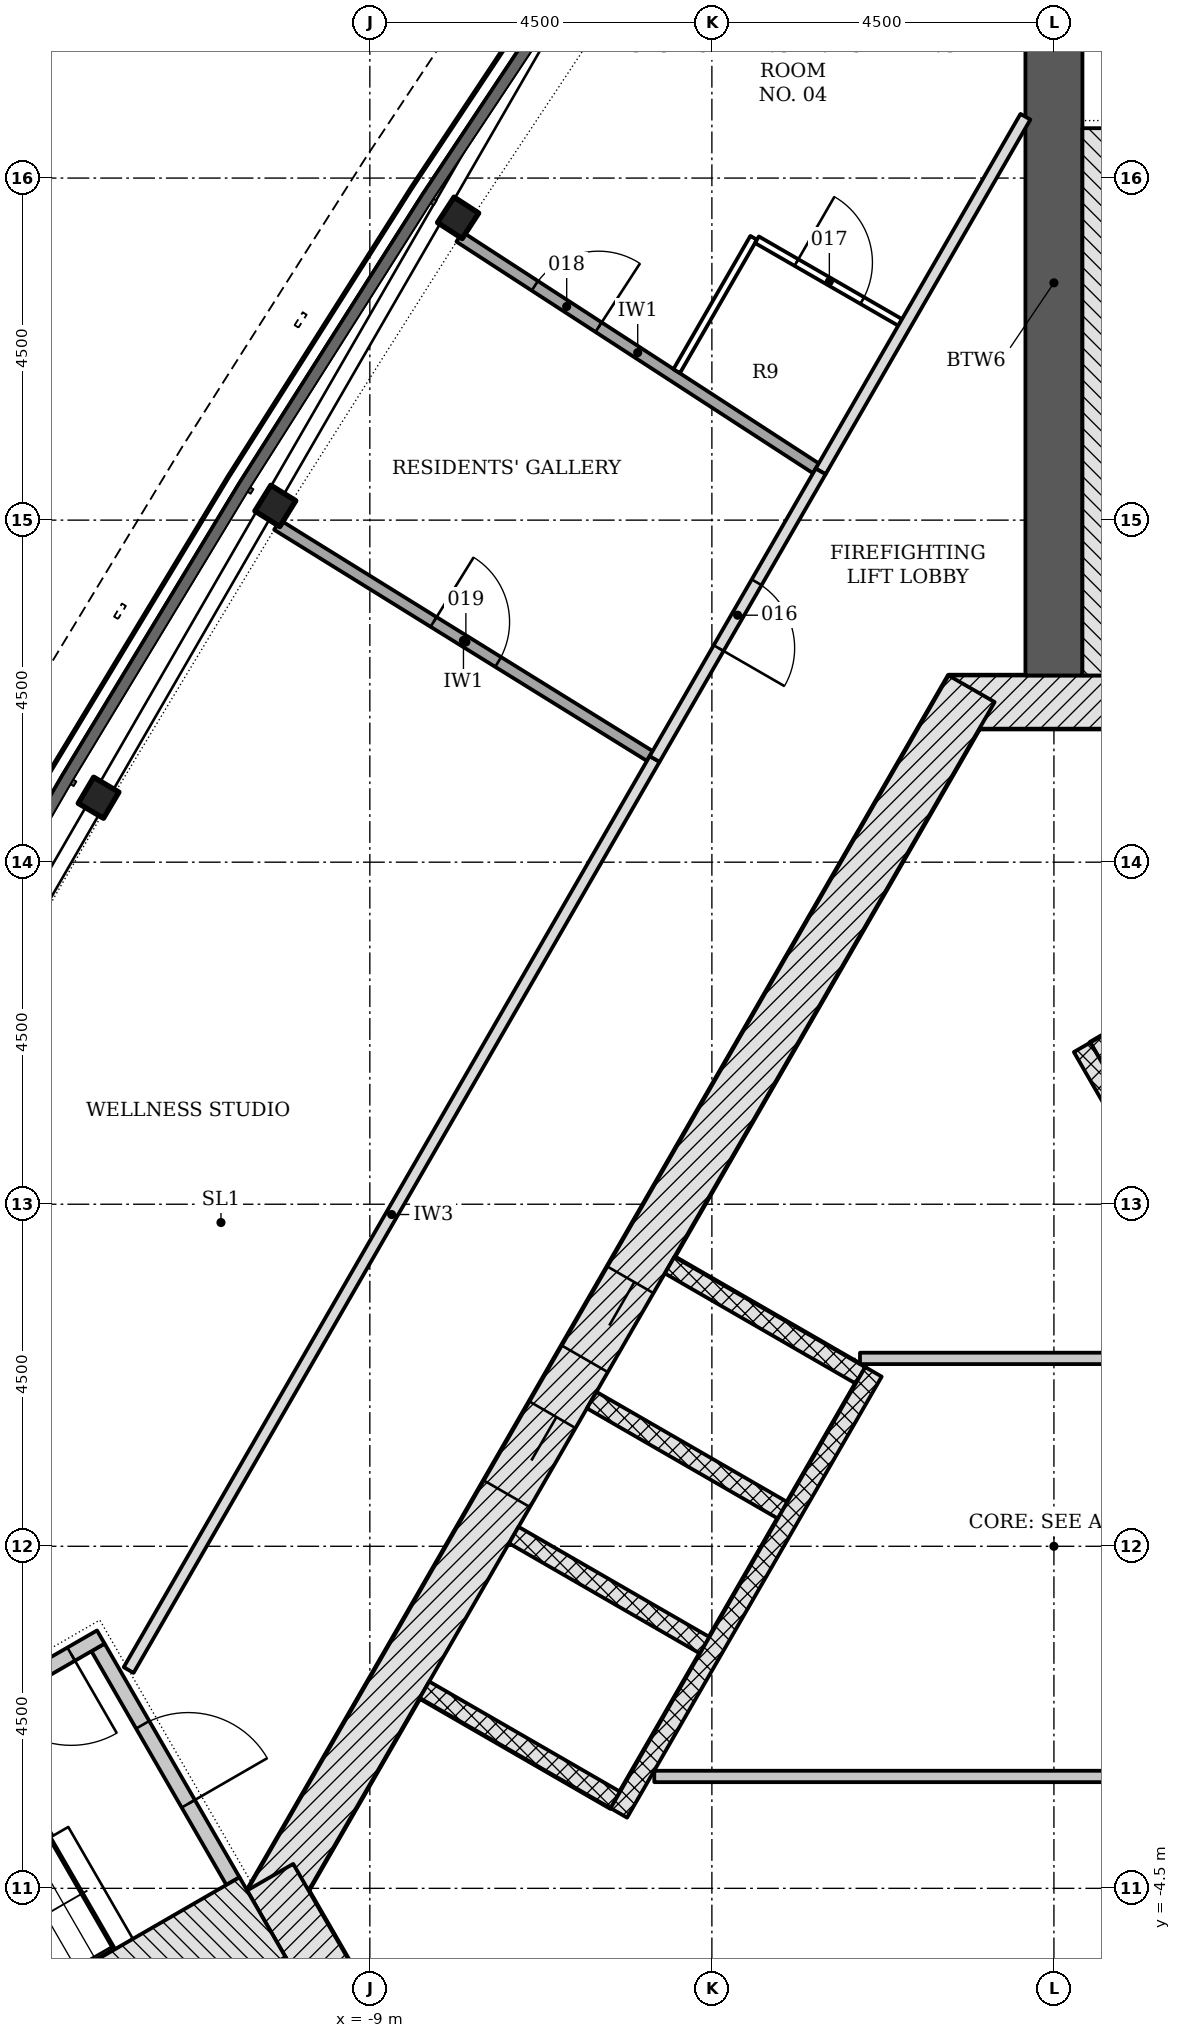
"""IFC4 building model, lengths in metres.
Left out: names, types, materials, properties, quantities, classifications, styles, units other than length and angle.
Written with IfcOpenShell. Run it as: python <this file> out.ifc"""

import sys

from ifc_helpers import new_model, si_unit, direction, frame, frame_2d, origin, origin_2d, place, context, subcontext, project, spatial, rectangle, i_section, extrude, element, fill, save


model = new_model("IFC4")
c1 = context("Model", 3, precision=1e-05, world=origin(), true_north=direction((0.0, 1.0)))
c2 = subcontext(c1, "Body", "Model", "MODEL_VIEW")
j1 = project(units=[si_unit("LENGTHUNIT", "METRE"), si_unit("PLANEANGLEUNIT", "RADIAN")], contexts=[c1])
p1 = place(None, origin())
s1 = spatial("IfcSite", under=j1, at=p1, CompositionType="ELEMENT")
p2 = place(p1, origin())
s2 = spatial("IfcBuilding", under=s1, at=p2, CompositionType="ELEMENT")
p3 = place(p2, frame((0.0, 0.0, 158.1)))
s3 = spatial("IfcBuildingStorey", under=s2, at=p3, CompositionType="ELEMENT", Elevation=158.1)
p4 = place(p3, frame((1.386, 11.106, -0.2), z_axis=(0.0, 0.0, 1.0), x_axis=(-1.0, 0.0, 0.0)))
e1 = element("IfcWall", 1, at=p4, inside=s3, PredefinedType="SHEAR", context=c2, shape_type="SweptSolid", body=[
    extrude(rectangle(XDim=2.771, YDim=0.7, at=frame_2d((1.386, 0.0))), origin(), (0.0, 0.0, 1.0), 3.6),
])
p5 = place(p3, frame((-1.083, 11.281, -0.2), z_axis=(0.0, 0.0, 1.0), x_axis=(-0.500001446645, -0.866024568562, 0.0)))
e2 = element("IfcWall", 2, at=p5, inside=s3, PredefinedType="SHEAR", context=c2, shape_type="SweptSolid", body=[
    extrude(rectangle(XDim=18.458, YDim=0.7, at=frame_2d((9.229, 0.0))), origin(), (0.0, 0.0, 1.0), 3.6),
])
p6 = place(p5, frame((8.979, 0.0, 0.2)))
e3 = element("IfcOpeningElement", 3, at=p6, cuts=e2, PredefinedType="OPENING", context=c2, shape_type="SweptSolid", body=[
    extrude(rectangle(XDim=1.2, YDim=2.1, at=frame_2d((0.6, 1.05))), frame((0.0, 0.36, 0.0), z_axis=(0.0, -1.0, 0.0), x_axis=(1.0, 0.0, 0.0)), (0.0, 0.0, 1.0), 0.72),
])
p7 = place(p5, frame((11.029, 0.0, 0.2)))
e4 = element("IfcOpeningElement", 4, at=p7, cuts=e2, PredefinedType="OPENING", context=c2, shape_type="SweptSolid", body=[
    extrude(rectangle(XDim=1.2, YDim=2.1, at=frame_2d((0.6, 1.05))), frame((0.0, 0.36, 0.0), z_axis=(0.0, -1.0, 0.0), x_axis=(1.0, 0.0, 0.0)), (0.0, 0.0, 1.0), 0.72),
])
p8 = place(p3, frame((-10.311, -4.353, -0.2), z_axis=(0.0, 0.0, 1.0), x_axis=(0.500042739161, -0.866000726912, 0.0)))
e5 = element("IfcWall", 5, at=p8, inside=s3, PredefinedType="SHEAR", context=c2, shape_type="SweptSolid", body=[
    extrude(rectangle(XDim=2.771, YDim=0.7, at=frame_2d((1.386, 0.0))), origin(), (0.0, 0.0, 1.0), 3.6),
])
p9 = place(p3, frame((0.0, 11.456, -0.2), z_axis=(0.0, 0.0, 1.0), x_axis=(0.0, 1.0, 0.0)))
e6 = element("IfcWall", 6, at=p9, inside=s3, PredefinedType="SHEAR", context=c2, shape_type="SweptSolid", body=[
    extrude(rectangle(XDim=10.331, YDim=0.75, at=frame_2d((5.166, 0.0))), origin(), (0.0, 0.0, 1.0), 3.6),
])
p10 = place(p3, frame((-9.922, -5.728, -0.2), z_axis=(0.0, 0.0, 1.0), x_axis=(-0.866025410072, -0.499999989109, 0.0)))
e7 = element("IfcWall", 7, at=p10, inside=s3, PredefinedType="SHEAR", context=c2, shape_type="SweptSolid", body=[
    extrude(rectangle(XDim=10.331, YDim=0.75, at=frame_2d((5.165, 0.0))), origin(), (0.0, 0.0, 1.0), 3.6),
])
for number, where, z_axis, x_axis in (
    (8, (-7.839, 17.477, -0.2), (0.0, 0.0, 1.0), (-0.545, -0.839, 0.0)),
    (9, (-10.244, 13.687, -0.2), (0.0, 0.0, 1.0), (-0.527, -0.85, 0.0)),
    (10, (-12.569, 9.848, -0.2), (0.0, 0.0, 1.0), (-0.509, -0.861, 0.0)),
):
    element("IfcColumn", number, at=place(p3, frame(where, z_axis=z_axis, x_axis=x_axis)), inside=s3, PredefinedType="COLUMN", context=c2, shape_type="SweptSolid", body=[
        extrude(i_section(OverallWidth=0.399, OverallDepth=0.386, WebThickness=0.021, FlangeThickness=0.033, FilletRadius=0.015, at=origin_2d()), origin(), (0.0, 0.0, 1.0), 3.6),
    ])
p11 = place(p3, frame((2.706, 7.769, -0.2), z_axis=(0.0, 0.0, 1.0), x_axis=(-0.866022959057, -0.500004234368, 0.0)))
e11 = element("IfcWall", 11, at=p11, inside=s3, PredefinedType="PARTITIONING", context=c2, shape_type="SweptSolid", body=[
    extrude(rectangle(XDim=2.5, YDim=0.25, at=frame_2d((1.25, 0.0))), origin(), (0.0, 0.0, 1.0), 3.6),
])
p12 = place(p3, frame((5.87, -2.961, 0.0), z_axis=(0.0, 0.0, 1.0), x_axis=(-0.50000615651, 0.866021849293, 0.0)))
e12 = element("IfcWall", 12, at=p12, inside=s3, PredefinedType="PARTITIONING", context=c2, shape_type="SweptSolid", body=[
    extrude(rectangle(XDim=11.0, YDim=0.25, at=frame_2d((5.5, 0.0))), origin(), (0.0, 0.0, 1.0), 3.4),
])
for number, where, z_axis, x_axis in (
    (13, (-5.056, 3.699, -0.2), (0.0, 0.0, 1.0), (0.866, -0.5, 0.0)),
    (14, (-6.081, 1.923, -0.2), (0.0, 0.0, 1.0), (0.866, -0.5, 0.0)),
    (15, (-7.106, 0.148, -0.2), (0.0, 0.0, 1.0), (0.866, -0.5, 0.0)),
    (16, (-8.281, -1.887, -0.2), (0.0, 0.0, 1.0), (0.866, -0.5, 0.0)),
):
    element("IfcWall", number, at=place(p3, frame(where, z_axis=z_axis, x_axis=x_axis)), inside=s3, PredefinedType="PARTITIONING", context=c2, shape_type="SweptSolid", body=[
        extrude(rectangle(XDim=2.9, YDim=0.25, at=frame_2d((1.45, 0.0))), origin(), (0.0, 0.0, 1.0), 3.6),
    ])
p13 = place(p3, frame((-2.374, 2.294, 0.0), z_axis=(0.0, 0.0, 1.0), x_axis=(-0.500003174267, -0.866023571113, 0.0)))
e17 = element("IfcWall", 17, at=p13, inside=s3, PredefinedType="PARTITIONING", context=c2, shape_type="SweptSolid", body=[
    extrude(rectangle(XDim=6.7, YDim=0.25, at=frame_2d((3.35, 0.0))), origin(), (0.0, 0.0, 1.0), 3.4),
])
p14 = place(p3, frame((-5.258, -3.028, 0.0), z_axis=(0.0, 0.0, 1.0), x_axis=(1.0, 0.0, 0.0)))
e18 = element("IfcWall", 18, at=p14, inside=s3, PredefinedType="PARTITIONING", context=c2, shape_type="SweptSolid", body=[
    extrude(rectangle(XDim=6.404, YDim=0.15, at=frame_2d((3.202, 0.0))), origin(), (0.0, 0.0, 1.0), 3.4),
])
p15 = place(p3, frame((-2.551, 2.472, 0.0), z_axis=(0.0, 0.0, 1.0), x_axis=(1.0, 0.0, 0.0)))
e19 = element("IfcWall", 19, at=p15, inside=s3, PredefinedType="PARTITIONING", context=c2, shape_type="SweptSolid", body=[
    extrude(rectangle(XDim=3.698, YDim=0.15, at=frame_2d((1.849, 0.0))), origin(), (0.0, 0.0, 1.0), 3.4),
])
p16 = place(p3, frame((0.98, 11.456, -0.2), z_axis=(0.0, 0.0, 1.0), x_axis=(0.0, 1.0, 0.0)))
e20 = element("IfcWall", 20, at=p16, inside=s3, PredefinedType="SHEAR", context=c2, shape_type="SweptSolid", body=[
    extrude(rectangle(XDim=7.2, YDim=1.211, at=frame_2d((3.6, 0.0))), origin(), (0.0, 0.0, 1.0), 3.6),
])
p17 = place(p3, frame((-12.576, -1.331, -0.2), z_axis=(0.0, 0.0, 1.0), x_axis=(0.499970499736, -0.8660424351, 0.0)))
e21 = element("IfcWall", 21, at=p17, inside=s3, PredefinedType="SHEAR", context=c2, shape_type="SweptSolid", body=[
    extrude(rectangle(XDim=3.55, YDim=0.2, at=frame_2d((1.775, 0.0))), origin(), (0.0, 0.0, 1.0), 3.6),
])
p18 = place(p17, frame((1.175, 0.0, 0.2)))
e22 = element("IfcOpeningElement", 22, at=p18, cuts=e21, PredefinedType="OPENING", context=c2, shape_type="SweptSolid", body=[
    extrude(rectangle(XDim=1.2, YDim=2.1, at=frame_2d((0.6, 1.05))), frame((0.0, 0.11, 0.0), z_axis=(0.0, -1.0, 0.0), x_axis=(1.0, 0.0, 0.0)), (0.0, 0.0, 1.0), 0.22),
])
p19 = place(p3, frame((-12.539, -1.194, -0.2), z_axis=(0.0, 0.0, 1.0), x_axis=(-0.866045472092, -0.499965239061, 0.0)))
e23 = element("IfcWall", 23, at=p19, inside=s3, PredefinedType="SHEAR", context=c2, shape_type="SweptSolid", body=[
    extrude(rectangle(XDim=5.6, YDim=0.2, at=frame_2d((2.8, 0.0))), origin(), (0.0, 0.0, 1.0), 3.6),
])
p20 = place(p19, frame((0.45, 0.0, 0.2)))
e24 = element("IfcOpeningElement", 24, at=p20, cuts=e23, PredefinedType="OPENING", context=c2, shape_type="SweptSolid", body=[
    extrude(rectangle(XDim=1.2, YDim=2.1, at=frame_2d((0.6, 1.05))), frame((0.0, 0.11, 0.0), z_axis=(0.0, -1.0, 0.0), x_axis=(1.0, 0.0, 0.0)), (0.0, 0.0, 1.0), 0.22),
])
p21 = place(p3, frame((-10.412, -4.879, -0.2), z_axis=(0.0, 0.0, 1.0), x_axis=(-0.866026919366, -0.499997374926, 0.0)))
e25 = element("IfcWall", 25, at=p21, inside=s3, PredefinedType="SHEAR", context=c2, shape_type="SweptSolid", body=[
    extrude(rectangle(XDim=7.2, YDim=1.211, at=frame_2d((3.6, 0.0))), origin(), (0.0, 0.0, 1.0), 3.6),
])
p22 = place(p3, frame((-0.375, 18.807, 0.0), z_axis=(0.0, 0.0, 1.0), x_axis=(-0.499989180974, -0.866031650062, 0.0)))
e26 = element("IfcWall", 26, at=p22, inside=s3, PredefinedType="PARTITIONING", context=c2, shape_type="SweptSolid", body=[
    extrude(rectangle(XDim=5.388, YDim=0.15, at=frame_2d((2.694, 0.0))), origin(), (0.0, 0.0, 1.0), 2.847),
])
p23 = place(p3, frame((-5.253, 10.358, 0.0), z_axis=(0.0, 0.0, 1.0), x_axis=(-0.49999425657, -0.86602871973, 0.0)))
e27 = element("IfcWall", 27, at=p23, inside=s3, PredefinedType="PARTITIONING", context=c2, shape_type="SweptSolid", body=[
    extrude(rectangle(XDim=13.84, YDim=0.15, at=frame_2d((6.92, 0.0))), origin(), (0.0, 0.0, 1.0), 2.847),
])
p24 = place(p3, frame((-7.82, 17.226, 0.0), z_axis=(0.0, 0.0, 1.0), x_axis=(0.838649113596, -0.544672070391, 0.0)))
e28 = element("IfcWall", 28, at=p24, inside=s3, PredefinedType="PARTITIONING", context=c2, shape_type="SweptSolid", body=[
    extrude(rectangle(XDim=5.59, YDim=0.15, at=frame_2d((2.795, 0.0))), origin(), (0.0, 0.0, 1.0), 3.4),
])
p25 = place(p24, frame((1.181, 0.0, 0.0)))
e29 = element("IfcOpeningElement", 29, at=p25, cuts=e28, PredefinedType="OPENING", context=c2, shape_type="SweptSolid", body=[
    extrude(rectangle(XDim=1.0, YDim=2.1, at=frame_2d((0.5, 1.05))), frame((0.0, 0.085, 0.0), z_axis=(0.0, -1.0, 0.0), x_axis=(1.0, 0.0, 0.0)), (0.0, 0.0, 1.0), 0.17),
])
p26 = place(p3, frame((-10.22, 13.437, 0.0), z_axis=(0.0, 0.0, 1.0), x_axis=(0.849899659129, -0.526944560094, 0.0)))
e30 = element("IfcWall", 30, at=p26, inside=s3, PredefinedType="PARTITIONING", context=c2, shape_type="SweptSolid", body=[
    extrude(rectangle(XDim=5.769, YDim=0.15, at=frame_2d((2.884, 0.0))), origin(), (0.0, 0.0, 1.0), 3.4),
])
p27 = place(p26, frame((2.422, 0.0, 0.0)))
e31 = element("IfcOpeningElement", 31, at=p27, cuts=e30, PredefinedType="OPENING", context=c2, shape_type="SweptSolid", body=[
    extrude(rectangle(XDim=1.0, YDim=2.1, at=frame_2d((0.5, 1.05))), frame((0.0, 0.085, 0.0), z_axis=(0.0, -1.0, 0.0), x_axis=(1.0, 0.0, 0.0)), (0.0, 0.0, 1.0), 0.17),
])
p28 = place(p3, frame((-3.069, 14.141, 0.0), z_axis=(0.0, 0.0, 1.0), x_axis=(-0.500015937133, -0.866016202281, 0.0)))
e32 = element("IfcWall", 32, at=p28, inside=s3, PredefinedType="PARTITIONING", context=c2, shape_type="SweptSolid", body=[
    extrude(rectangle(XDim=4.368, YDim=0.15, at=frame_2d((2.184, 0.0))), origin(), (0.0, 0.0, 1.0), 2.847),
])
p29 = place(p28, frame((1.684, 0.0, 0.0)))
e33 = element("IfcOpeningElement", 33, at=p29, cuts=e32, PredefinedType="OPENING", context=c2, shape_type="SweptSolid", body=[
    extrude(rectangle(XDim=1.0, YDim=2.1, at=frame_2d((0.5, 1.05))), frame((0.0, 0.085, 0.0), z_axis=(0.0, -1.0, 0.0), x_axis=(1.0, 0.0, 0.0)), (0.0, 0.0, 1.0), 0.17),
])
p30 = place(p3, frame((-4.963, 15.46, 0.0), z_axis=(0.0, 0.0, 1.0), x_axis=(0.499990325971, 0.866030989016, 0.0)))
e34 = element("IfcWall", 34, at=p30, inside=s3, PredefinedType="PARTITIONING", context=c2, shape_type="SweptSolid", body=[
    extrude(rectangle(XDim=2.025, YDim=0.1, at=frame_2d((1.012, 0.0))), origin(), (0.0, 0.0, 1.0), 2.847),
])
p31 = place(p3, frame((-3.907, 17.189, 0.0), z_axis=(0.0, 0.0, 1.0), x_axis=(0.865989304205, -0.500062521093, 0.0)))
e35 = element("IfcWall", 35, at=p31, inside=s3, PredefinedType="PARTITIONING", context=c2, shape_type="SweptSolid", body=[
    extrude(rectangle(XDim=2.175, YDim=0.1, at=frame_2d((1.087, 0.0))), origin(), (0.0, 0.0, 1.0), 3.4),
])
p32 = place(p31, frame((0.6, 0.0, 0.0)))
e36 = element("IfcOpeningElement", 36, at=p32, cuts=e35, PredefinedType="OPENING", context=c2, shape_type="SweptSolid", body=[
    extrude(rectangle(XDim=1.0, YDim=2.1, at=frame_2d((0.5, 1.05))), frame((0.0, 0.06, 0.0), z_axis=(0.0, -1.0, 0.0), x_axis=(1.0, 0.0, 0.0)), (0.0, 0.0, 1.0), 0.12),
])
p33 = place(p6, origin())
e37 = element("IfcDoor", 37, at=p33, inside=s3, OperationType="DOUBLE_DOOR_SLIDING", PredefinedType="DOOR", context=c2, shape_type="SweptSolid", body=[
    extrude(rectangle(XDim=1.2, YDim=2.1, at=frame_2d((0.6, 1.05))), frame((0.0, 0.025, 0.0), z_axis=(0.0, -1.0, 0.0), x_axis=(1.0, 0.0, 0.0)), (0.0, 0.0, 1.0), 0.05),
])
fill(e3, e37)
p34 = place(p7, origin())
e38 = element("IfcDoor", 38, at=p34, inside=s3, OperationType="DOUBLE_DOOR_SLIDING", PredefinedType="DOOR", context=c2, shape_type="SweptSolid", body=[
    extrude(rectangle(XDim=1.2, YDim=2.1, at=frame_2d((0.6, 1.05))), frame((0.0, 0.025, 0.0), z_axis=(0.0, -1.0, 0.0), x_axis=(1.0, 0.0, 0.0)), (0.0, 0.0, 1.0), 0.05),
])
fill(e4, e38)
p35 = place(p18, origin())
e39 = element("IfcDoor", 39, at=p35, inside=s3, OperationType="SINGLE_SWING_RIGHT", PredefinedType="DOOR", context=c2, shape_type="SweptSolid", body=[
    extrude(rectangle(XDim=1.2, YDim=2.1, at=frame_2d((0.6, 1.05))), frame((0.0, 0.025, 0.0), z_axis=(0.0, -1.0, 0.0), x_axis=(1.0, 0.0, 0.0)), (0.0, 0.0, 1.0), 0.05),
])
fill(e22, e39)
p36 = place(p20, origin())
e40 = element("IfcDoor", 40, at=p36, inside=s3, OperationType="SINGLE_SWING_LEFT", PredefinedType="DOOR", context=c2, shape_type="SweptSolid", body=[
    extrude(rectangle(XDim=1.2, YDim=2.1, at=frame_2d((0.6, 1.05))), frame((0.0, 0.025, 0.0), z_axis=(0.0, -1.0, 0.0), x_axis=(1.0, 0.0, 0.0)), (0.0, 0.0, 1.0), 0.05),
])
fill(e24, e40)
p37 = place(p29, origin())
e41 = element("IfcDoor", 41, at=p37, inside=s3, OperationType="SINGLE_SWING_RIGHT", PredefinedType="DOOR", context=c2, shape_type="SweptSolid", body=[
    extrude(rectangle(XDim=1.0, YDim=2.1, at=frame_2d((0.5, 1.05))), frame((0.0, 0.025, 0.0), z_axis=(0.0, -1.0, 0.0), x_axis=(1.0, 0.0, 0.0)), (0.0, 0.0, 1.0), 0.05),
])
fill(e33, e41)
p38 = place(p32, origin())
e42 = element("IfcDoor", 42, at=p38, inside=s3, OperationType="SINGLE_SWING_LEFT", PredefinedType="DOOR", context=c2, shape_type="SweptSolid", body=[
    extrude(rectangle(XDim=1.0, YDim=2.1, at=frame_2d((0.5, 1.05))), frame((0.0, 0.025, 0.0), z_axis=(0.0, -1.0, 0.0), x_axis=(1.0, 0.0, 0.0)), (0.0, 0.0, 1.0), 0.05),
])
fill(e36, e42)
p39 = place(p25, origin())
e43 = element("IfcDoor", 43, at=p39, inside=s3, OperationType="SINGLE_SWING_RIGHT", PredefinedType="DOOR", context=c2, shape_type="SweptSolid", body=[
    extrude(rectangle(XDim=1.0, YDim=2.1, at=frame_2d((0.5, 1.05))), frame((0.0, 0.025, 0.0), z_axis=(0.0, -1.0, 0.0), x_axis=(1.0, 0.0, 0.0)), (0.0, 0.0, 1.0), 0.05),
])
fill(e29, e43)
p40 = place(p27, origin())
e44 = element("IfcDoor", 44, at=p40, inside=s3, OperationType="SINGLE_SWING_LEFT", PredefinedType="DOOR", context=c2, shape_type="SweptSolid", body=[
    extrude(rectangle(XDim=1.0, YDim=2.1, at=frame_2d((0.5, 1.05))), frame((0.0, 0.025, 0.0), z_axis=(0.0, -1.0, 0.0), x_axis=(1.0, 0.0, 0.0)), (0.0, 0.0, 1.0), 0.05),
])
fill(e31, e44)
save(model, sys.argv[1])
